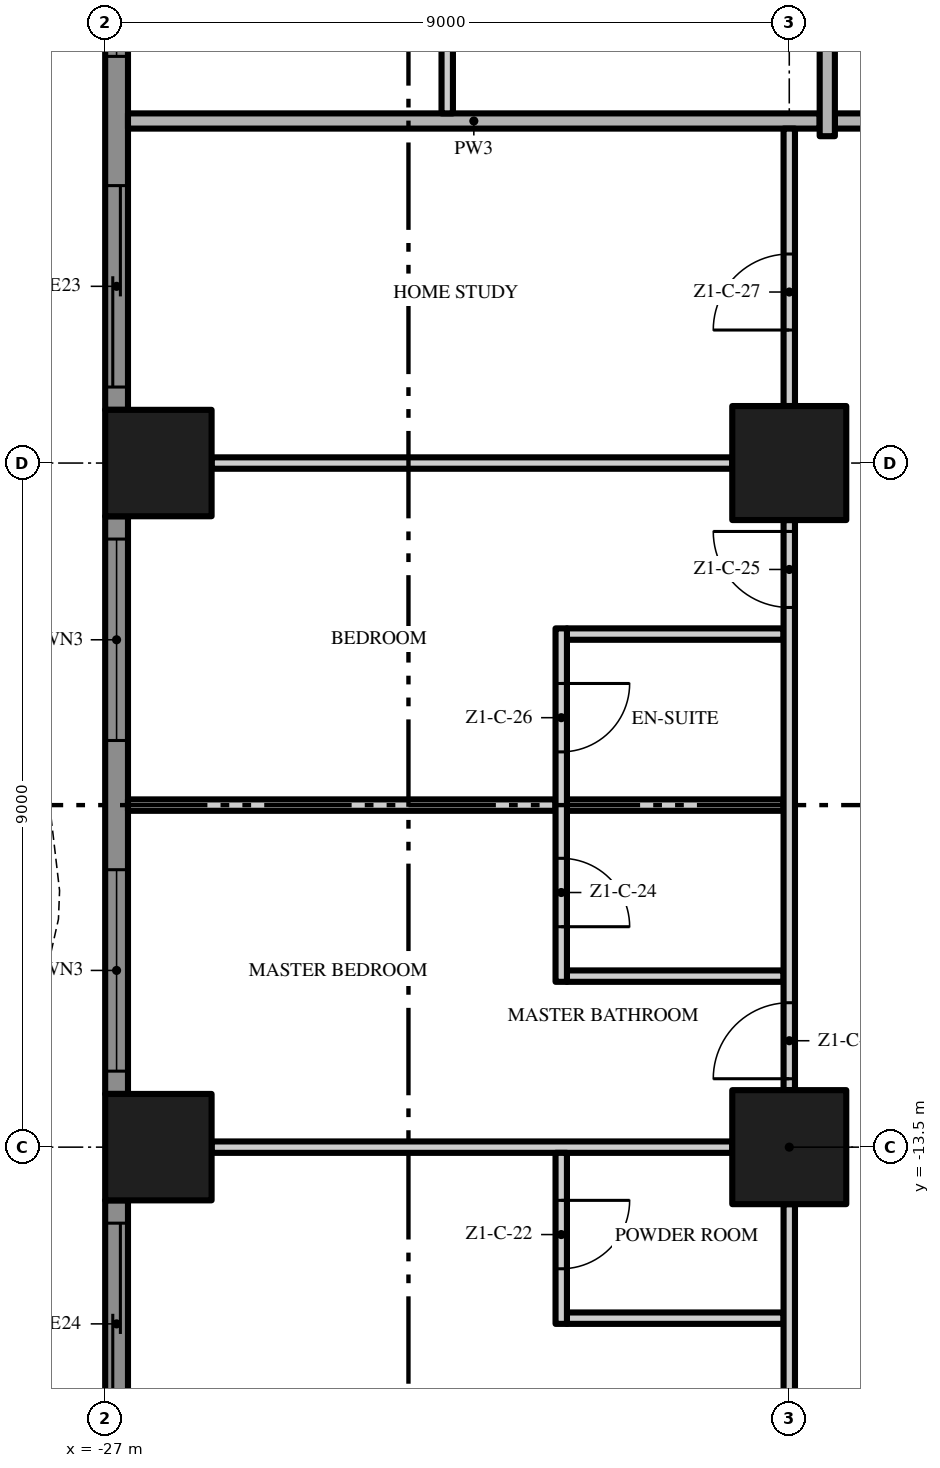
"""IFC4 building model, lengths in metres.
Left out: names, types, materials, properties, quantities, classifications, styles, units other than length and angle.
Written with IfcOpenShell. Run it as: python <this file> out.ifc"""

import sys

from ifc_helpers import new_model, si_unit, direction, frame, frame_2d, origin, origin_2d, place, context, subcontext, project, spatial, polyline, rectangle, outline, extrude, element, fill, save


model = new_model("IFC4")
c1 = context("Model", 3, precision=1e-05, world=origin(), true_north=direction((0.0, 1.0)))
c2 = subcontext(c1, "Body", "Model", "MODEL_VIEW")
j1 = project(units=[si_unit("LENGTHUNIT", "METRE"), si_unit("PLANEANGLEUNIT", "RADIAN")], contexts=[c1])
p1 = place(None, origin())
s1 = spatial("IfcSite", under=j1, at=p1, CompositionType="ELEMENT")
p2 = place(p1, origin())
s2 = spatial("IfcBuilding", under=s1, at=p2, CompositionType="ELEMENT")
p3 = place(p2, frame((0.0, 0.0, 41.6)))
s3 = spatial("IfcBuildingStorey", under=s2, at=p3, CompositionType="ELEMENT", Elevation=41.6)
for number, where, z_axis, x_axis in (
    (1, (-18.0, -13.5, 0.0), (0.0, 0.0, 1.0), (1.0, 0.0, 0.0)),
    (2, (-18.0, -4.5, 0.0), (0.0, 0.0, 1.0), (1.0, 0.0, 0.0)),
):
    element("IfcColumn", number, at=place(p3, frame(where, z_axis=z_axis, x_axis=x_axis)), inside=s3, PredefinedType="COLUMN", context=c2, shape_type="SweptSolid", body=[
        extrude(rectangle(XDim=1.5, YDim=1.5, at=origin_2d()), origin(), (0.0, 0.0, 1.0), 3.5),
    ])
for number, where, z_axis, x_axis in (
    (3, (-26.3, -13.5, 0.0), (0.0, 0.0, 1.0), (1.0, 0.0, 0.0)),
    (4, (-26.3, -4.5, 0.0), (0.0, 0.0, 1.0), (1.0, 0.0, 0.0)),
):
    element("IfcColumn", number, at=place(p3, frame(where, z_axis=z_axis, x_axis=x_axis)), inside=s3, PredefinedType="COLUMN", context=c2, shape_type="SweptSolid", body=[
        extrude(rectangle(XDim=1.4, YDim=1.4, at=origin_2d()), origin(), (0.0, 0.0, 1.0), 3.5),
    ])
p4 = place(p3, frame((-26.85, -3.8, 0.0), z_axis=(0.0, 0.0, 1.0), x_axis=(0.0, 1.0, 0.0)))
e5 = element("IfcWall", 5, at=p4, inside=s3, PredefinedType="SOLIDWALL", context=c2, shape_type="SweptSolid", body=[
    extrude(rectangle(XDim=7.6, YDim=0.3, at=frame_2d((3.8, 0.0))), origin(), (0.0, 0.0, 1.0), 3.5),
])
p5 = place(p4, frame((4.65, 0.0, 0.45)))
e6 = element("IfcOpeningElement", 6, at=p5, cuts=e5, PredefinedType="OPENING", context=c2, shape_type="SweptSolid", body=[
    extrude(rectangle(XDim=2.65, YDim=2.65, at=frame_2d((1.325, 1.325))), frame((0.0, 0.16, 0.0), z_axis=(0.0, -1.0, 0.0), x_axis=(1.0, 0.0, 0.0)), (0.0, 0.0, 1.0), 0.32),
])
p6 = place(p4, frame((0.3, 0.0, 0.0)))
e7 = element("IfcOpeningElement", 7, at=p6, cuts=e5, PredefinedType="OPENING", context=c2, shape_type="SweptSolid", body=[
    extrude(rectangle(XDim=2.65, YDim=2.4, at=frame_2d((1.325, 1.2))), frame((0.0, 0.16, 0.0), z_axis=(0.0, -1.0, 0.0), x_axis=(1.0, 0.0, 0.0)), (0.0, 0.0, 1.0), 0.32),
])
p7 = place(p3, frame((-26.85, -12.8, 0.0), z_axis=(0.0, 0.0, 1.0), x_axis=(0.0, 1.0, 0.0)))
e8 = element("IfcWall", 8, at=p7, inside=s3, PredefinedType="SOLIDWALL", context=c2, shape_type="SweptSolid", body=[
    extrude(rectangle(XDim=7.6, YDim=0.3, at=frame_2d((3.8, 0.0))), origin(), (0.0, 0.0, 1.0), 3.5),
])
p8 = place(p7, frame((4.65, 0.0, 0.45)))
e9 = element("IfcOpeningElement", 9, at=p8, cuts=e8, PredefinedType="OPENING", context=c2, shape_type="SweptSolid", body=[
    extrude(rectangle(XDim=2.65, YDim=2.65, at=frame_2d((1.325, 1.325))), frame((0.0, 0.16, 0.0), z_axis=(0.0, -1.0, 0.0), x_axis=(1.0, 0.0, 0.0)), (0.0, 0.0, 1.0), 0.32),
])
p9 = place(p7, frame((0.3, 0.0, 0.45)))
e10 = element("IfcOpeningElement", 10, at=p9, cuts=e8, PredefinedType="OPENING", context=c2, shape_type="SweptSolid", body=[
    extrude(rectangle(XDim=2.65, YDim=2.65, at=frame_2d((1.325, 1.325))), frame((0.0, 0.16, 0.0), z_axis=(0.0, -1.0, 0.0), x_axis=(1.0, 0.0, 0.0)), (0.0, 0.0, 1.0), 0.32),
])
p10 = place(p3, frame((-26.85, -18.0, 0.0), z_axis=(0.0, 0.0, 1.0), x_axis=(0.0, 1.0, 0.0)))
e11 = element("IfcWall", 11, at=p10, inside=s3, PredefinedType="SOLIDWALL", context=c2, shape_type="SweptSolid", body=[
    extrude(rectangle(XDim=3.8, YDim=0.3, at=frame_2d((1.9, 0.0))), origin(), (0.0, 0.0, 1.0), 3.5),
])
p11 = place(p10, frame((0.85, 0.0, 0.0)))
e12 = element("IfcOpeningElement", 12, at=p11, cuts=e11, PredefinedType="OPENING", context=c2, shape_type="SweptSolid", body=[
    extrude(rectangle(XDim=2.65, YDim=2.4, at=frame_2d((1.325, 1.2))), frame((0.0, 0.16, 0.0), z_axis=(0.0, -1.0, 0.0), x_axis=(1.0, 0.0, 0.0)), (0.0, 0.0, 1.0), 0.32),
])
p12 = place(p3, origin())
e13 = element("IfcWall", 13, at=p12, inside=s3, PredefinedType="USERDEFINED", context=c2, shape_type="SweptSolid", body=[
    extrude(outline(polyline([(-27.951, 18.0), (-28.612, 16.5), (-29.345, 15.0), (-29.869, 13.5), (-30.0, 12.375), (-29.985, 12.0), (-29.649, 10.5), (-28.988, 9.0), (-28.255, 7.5), (-27.731, 6.0), (-27.6, 4.875), (-27.615, 4.5), (-27.951, 3.0), (-28.612, 1.5), (-29.345, 0.0), (-29.869, -1.5), (-30.0, -2.625), (-29.985, -3.0), (-29.649, -4.5), (-28.988, -6.0), (-28.255, -7.5), (-27.731, -9.0), (-27.6, -10.125), (-27.615, -10.5), (-27.951, -12.0), (-28.612, -13.5), (-29.345, -15.0), (-29.869, -16.5), (-30.0, -17.625), (-29.985, -18.0), (-29.735, -17.99), (-29.749, -17.635), (-29.624, -16.556), (-29.114, -15.096), (-28.385, -13.605), (-27.713, -12.079), (-27.366, -10.533), (-27.349, -10.115), (-27.486, -8.944), (-28.024, -7.404), (-28.761, -5.895), (-29.41, -4.421), (-29.736, -2.967), (-29.749, -2.635), (-29.624, -1.556), (-29.114, -0.096), (-28.385, 1.395), (-27.713, 2.921), (-27.366, 4.467), (-27.349, 4.885), (-27.486, 6.056), (-28.024, 7.596), (-28.761, 9.105), (-29.41, 10.579), (-29.736, 12.033), (-29.749, 12.365), (-29.624, 13.444), (-29.114, 14.904), (-28.385, 16.395), (-27.723, 17.899), (-27.951, 18.0)])), origin(), (0.0, 0.0, 1.0), 0.9),
])
p13 = place(p3, frame((-20.925, -15.75, 0.0), z_axis=(0.0, 0.0, 1.0), x_axis=(1.0, 0.0, 0.0)))
e14 = element("IfcWall", 14, at=p13, inside=s3, PredefinedType="PARTITIONING", context=c2, shape_type="SweptSolid", body=[
    extrude(rectangle(XDim=2.85, YDim=0.15, at=frame_2d((1.425, 0.0))), origin(), (0.0, 0.0, 1.0), 3.5),
])
p14 = place(p3, frame((-25.6, -13.5, 0.0), z_axis=(0.0, 0.0, 1.0), x_axis=(1.0, 0.0, 0.0)))
e15 = element("IfcWall", 15, at=p14, inside=s3, PredefinedType="PARTITIONING", context=c2, shape_type="SweptSolid", body=[
    extrude(rectangle(XDim=6.85, YDim=0.15, at=frame_2d((3.425, 0.0))), origin(), (0.0, 0.0, 1.0), 3.5),
])
p15 = place(p3, frame((-20.925, -11.25, 0.0), z_axis=(0.0, 0.0, 1.0), x_axis=(1.0, 0.0, 0.0)))
e16 = element("IfcWall", 16, at=p15, inside=s3, PredefinedType="PARTITIONING", context=c2, shape_type="SweptSolid", body=[
    extrude(rectangle(XDim=2.85, YDim=0.15, at=frame_2d((1.425, 0.0))), origin(), (0.0, 0.0, 1.0), 3.5),
])
p16 = place(p3, frame((-26.7, -9.0, 0.0), z_axis=(0.0, 0.0, 1.0), x_axis=(1.0, 0.0, 0.0)))
e17 = element("IfcWall", 17, at=p16, inside=s3, PredefinedType="PARTITIONING", context=c2, shape_type="SweptSolid", body=[
    extrude(rectangle(XDim=5.625, YDim=0.15, at=frame_2d((2.812, 0.0))), origin(), (0.0, 0.0, 1.0), 3.5),
])
for number, where, z_axis, x_axis in (
    (18, (-20.925, -9.0, 0.0), (0.0, 0.0, 1.0), (1.0, 0.0, 0.0)),
    (19, (-20.925, -6.75, 0.0), (0.0, 0.0, 1.0), (1.0, 0.0, 0.0)),
):
    element("IfcWall", number, at=place(p3, frame(where, z_axis=z_axis, x_axis=x_axis)), inside=s3, PredefinedType="PARTITIONING", context=c2, shape_type="SweptSolid", body=[
        extrude(rectangle(XDim=2.85, YDim=0.15, at=frame_2d((1.425, 0.0))), origin(), (0.0, 0.0, 1.0), 3.5),
    ])
p17 = place(p3, frame((-25.6, -4.5, 0.0), z_axis=(0.0, 0.0, 1.0), x_axis=(1.0, 0.0, 0.0)))
e20 = element("IfcWall", 20, at=p17, inside=s3, PredefinedType="PARTITIONING", context=c2, shape_type="SweptSolid", body=[
    extrude(rectangle(XDim=6.85, YDim=0.15, at=frame_2d((3.425, 0.0))), origin(), (0.0, 0.0, 1.0), 3.5),
])
p18 = place(p3, frame((-17.4, 0.0, 0.0), z_axis=(0.0, 0.0, 1.0), x_axis=(1.0, 0.0, 0.0)))
e21 = element("IfcWall", 21, at=p18, inside=s3, PredefinedType="PARTITIONING", context=c2, shape_type="SweptSolid", body=[
    extrude(rectangle(XDim=12.8, YDim=0.2, at=frame_2d((6.4, 0.0))), origin(), (0.0, 0.0, 1.0), 3.5),
])
p19 = place(p3, frame((-26.7, 0.0, 0.0), z_axis=(0.0, 0.0, 1.0), x_axis=(1.0, 0.0, 0.0)))
e22 = element("IfcWall", 22, at=p19, inside=s3, PredefinedType="PARTITIONING", context=c2, shape_type="SweptSolid", body=[
    extrude(rectangle(XDim=9.1, YDim=0.2, at=frame_2d((4.55, 0.0))), origin(), (0.0, 0.0, 1.0), 3.5),
])
p20 = place(p3, frame((-22.5, 0.1, 0.0), z_axis=(0.0, 0.0, 1.0), x_axis=(0.0, 1.0, 0.0)))
e23 = element("IfcWall", 23, at=p20, inside=s3, PredefinedType="PARTITIONING", context=c2, shape_type="SweptSolid", body=[
    extrude(rectangle(XDim=17.2, YDim=0.15, at=frame_2d((8.6, 0.0))), origin(), (0.0, 0.0, 1.0), 3.5),
])
p21 = place(p20, frame((1.65, 0.0, 0.0)))
e24 = element("IfcOpeningElement", 24, at=p21, cuts=e23, PredefinedType="OPENING", context=c2, shape_type="SweptSolid", body=[
    extrude(rectangle(XDim=1.0, YDim=2.4, at=frame_2d((0.5, 1.2))), frame((0.0, 0.085, 0.0), z_axis=(0.0, -1.0, 0.0), x_axis=(1.0, 0.0, 0.0)), (0.0, 0.0, 1.0), 0.17),
])
p22 = place(p20, frame((8.0, 0.0, 0.0)))
e25 = element("IfcOpeningElement", 25, at=p22, cuts=e23, PredefinedType="OPENING", context=c2, shape_type="SweptSolid", body=[
    extrude(rectangle(XDim=1.8, YDim=2.4, at=frame_2d((0.9, 1.2))), frame((0.0, 0.085, 0.0), z_axis=(0.0, -1.0, 0.0), x_axis=(1.0, 0.0, 0.0)), (0.0, 0.0, 1.0), 0.17),
])
p23 = place(p20, frame((16.05, 0.0, 0.0)))
e26 = element("IfcOpeningElement", 26, at=p23, cuts=e23, PredefinedType="OPENING", context=c2, shape_type="SweptSolid", body=[
    extrude(rectangle(XDim=1.0, YDim=2.4, at=frame_2d((0.5, 1.2))), frame((0.0, 0.085, 0.0), z_axis=(0.0, -1.0, 0.0), x_axis=(1.0, 0.0, 0.0)), (0.0, 0.0, 1.0), 0.17),
])
p24 = place(p3, frame((-21.0, -13.575, 0.0), z_axis=(0.0, 0.0, 1.0), x_axis=(0.0, -1.0, 0.0)))
e27 = element("IfcWall", 27, at=p24, inside=s3, PredefinedType="PARTITIONING", context=c2, shape_type="SweptSolid", body=[
    extrude(rectangle(XDim=2.25, YDim=0.15, at=frame_2d((1.125, 0.0))), origin(), (0.0, 0.0, 1.0), 3.5),
])
p25 = place(p24, frame((0.625, 0.0, 0.0)))
e28 = element("IfcOpeningElement", 28, at=p25, cuts=e27, PredefinedType="OPENING", context=c2, shape_type="SweptSolid", body=[
    extrude(rectangle(XDim=0.9, YDim=2.1, at=frame_2d((0.45, 1.05))), frame((0.0, 0.085, 0.0), z_axis=(0.0, -1.0, 0.0), x_axis=(1.0, 0.0, 0.0)), (0.0, 0.0, 1.0), 0.17),
])
p26 = place(p3, frame((-21.0, -6.675, 0.0), z_axis=(0.0, 0.0, 1.0), x_axis=(0.0, -1.0, 0.0)))
e29 = element("IfcWall", 29, at=p26, inside=s3, PredefinedType="PARTITIONING", context=c2, shape_type="SweptSolid", body=[
    extrude(rectangle(XDim=4.65, YDim=0.15, at=frame_2d((2.325, 0.0))), origin(), (0.0, 0.0, 1.0), 3.5),
])
p27 = place(p26, frame((3.025, 0.0, 0.0)))
e30 = element("IfcOpeningElement", 30, at=p27, cuts=e29, PredefinedType="OPENING", context=c2, shape_type="SweptSolid", body=[
    extrude(rectangle(XDim=0.9, YDim=2.1, at=frame_2d((0.45, 1.05))), frame((0.0, 0.085, 0.0), z_axis=(0.0, -1.0, 0.0), x_axis=(1.0, 0.0, 0.0)), (0.0, 0.0, 1.0), 0.17),
])
p28 = place(p26, frame((0.725, 0.0, 0.0)))
e31 = element("IfcOpeningElement", 31, at=p28, cuts=e29, PredefinedType="OPENING", context=c2, shape_type="SweptSolid", body=[
    extrude(rectangle(XDim=0.9, YDim=2.1, at=frame_2d((0.45, 1.05))), frame((0.0, 0.085, 0.0), z_axis=(0.0, -1.0, 0.0), x_axis=(1.0, 0.0, 0.0)), (0.0, 0.0, 1.0), 0.17),
])
p29 = place(p3, frame((-18.0, -21.1, 0.0), z_axis=(0.0, 0.0, 1.0), x_axis=(0.0, 1.0, 0.0)))
e32 = element("IfcWall", 32, at=p29, inside=s3, PredefinedType="PARTITIONING", context=c2, shape_type="SweptSolid", body=[
    extrude(rectangle(XDim=6.85, YDim=0.15, at=frame_2d((3.425, 0.0))), origin(), (0.0, 0.0, 1.0), 3.5),
])
p30 = place(p29, frame((1.1, 0.0, 0.0)))
e33 = element("IfcOpeningElement", 33, at=p30, cuts=e32, PredefinedType="OPENING", context=c2, shape_type="SweptSolid", body=[
    extrude(rectangle(XDim=1.8, YDim=2.4, at=frame_2d((0.9, 1.2))), frame((0.0, 0.085, 0.0), z_axis=(0.0, -1.0, 0.0), x_axis=(1.0, 0.0, 0.0)), (0.0, 0.0, 1.0), 0.17),
])
p31 = place(p3, frame((-18.0, -12.75, 0.0), z_axis=(0.0, 0.0, 1.0), x_axis=(0.0, 1.0, 0.0)))
e34 = element("IfcWall", 34, at=p31, inside=s3, PredefinedType="PARTITIONING", context=c2, shape_type="SweptSolid", body=[
    extrude(rectangle(XDim=7.5, YDim=0.15, at=frame_2d((3.75, 0.0))), origin(), (0.0, 0.0, 1.0), 3.5),
])
p32 = place(p31, frame((0.15, 0.0, 0.0)))
e35 = element("IfcOpeningElement", 35, at=p32, cuts=e34, PredefinedType="OPENING", context=c2, shape_type="SweptSolid", body=[
    extrude(rectangle(XDim=1.0, YDim=2.4, at=frame_2d((0.5, 1.2))), frame((0.0, 0.085, 0.0), z_axis=(0.0, -1.0, 0.0), x_axis=(1.0, 0.0, 0.0)), (0.0, 0.0, 1.0), 0.17),
])
p33 = place(p31, frame((6.35, 0.0, 0.0)))
e36 = element("IfcOpeningElement", 36, at=p33, cuts=e34, PredefinedType="OPENING", context=c2, shape_type="SweptSolid", body=[
    extrude(rectangle(XDim=1.0, YDim=2.4, at=frame_2d((0.5, 1.2))), frame((0.0, 0.085, 0.0), z_axis=(0.0, -1.0, 0.0), x_axis=(1.0, 0.0, 0.0)), (0.0, 0.0, 1.0), 0.17),
])
p34 = place(p3, frame((-18.0, -3.75, 0.0), z_axis=(0.0, 0.0, 1.0), x_axis=(0.0, 1.0, 0.0)))
e37 = element("IfcWall", 37, at=p34, inside=s3, PredefinedType="PARTITIONING", context=c2, shape_type="SweptSolid", body=[
    extrude(rectangle(XDim=3.65, YDim=0.15, at=frame_2d((1.825, 0.0))), origin(), (0.0, 0.0, 1.0), 3.5),
])
p35 = place(p34, frame((1.0, 0.0, 0.0)))
e38 = element("IfcOpeningElement", 38, at=p35, cuts=e37, PredefinedType="OPENING", context=c2, shape_type="SweptSolid", body=[
    extrude(rectangle(XDim=1.0, YDim=2.4, at=frame_2d((0.5, 1.2))), frame((0.0, 0.085, 0.0), z_axis=(0.0, -1.0, 0.0), x_axis=(1.0, 0.0, 0.0)), (0.0, 0.0, 1.0), 0.17),
])
p36 = place(p3, frame((-17.5, -0.2, 0.0), z_axis=(0.0, 0.0, 1.0), x_axis=(0.0, 1.0, 0.0)))
e39 = element("IfcWall", 39, at=p36, inside=s3, PredefinedType="PARTITIONING", context=c2, shape_type="SweptSolid", body=[
    extrude(rectangle(XDim=3.95, YDim=0.2, at=frame_2d((1.975, 0.0))), origin(), (0.0, 0.0, 1.0), 3.5),
])
p37 = place(p5, origin())
e40 = element("IfcWindow", 40, at=p37, inside=s3, PartitioningType="SINGLE_PANEL", PredefinedType="WINDOW", context=c2, shape_type="SweptSolid", body=[
    extrude(rectangle(XDim=2.65, YDim=2.65, at=frame_2d((1.325, 1.325))), frame((0.0, 0.03, 0.0), z_axis=(0.0, -1.0, 0.0), x_axis=(1.0, 0.0, 0.0)), (0.0, 0.0, 1.0), 0.06),
])
fill(e6, e40)
p38 = place(p6, origin())
e41 = element("IfcDoor", 41, at=p38, inside=s3, OperationType="SINGLE_SWING_LEFT", PredefinedType="DOOR", context=c2, shape_type="SweptSolid", body=[
    extrude(rectangle(XDim=2.65, YDim=2.4, at=frame_2d((1.325, 1.2))), frame((0.0, 0.025, 0.0), z_axis=(0.0, -1.0, 0.0), x_axis=(1.0, 0.0, 0.0)), (0.0, 0.0, 1.0), 0.05),
])
fill(e7, e41)
p39 = place(p8, origin())
e42 = element("IfcWindow", 42, at=p39, inside=s3, PartitioningType="SINGLE_PANEL", PredefinedType="WINDOW", context=c2, shape_type="SweptSolid", body=[
    extrude(rectangle(XDim=2.65, YDim=2.65, at=frame_2d((1.325, 1.325))), frame((0.0, 0.03, 0.0), z_axis=(0.0, -1.0, 0.0), x_axis=(1.0, 0.0, 0.0)), (0.0, 0.0, 1.0), 0.06),
])
fill(e9, e42)
p40 = place(p9, origin())
e43 = element("IfcWindow", 43, at=p40, inside=s3, PartitioningType="SINGLE_PANEL", PredefinedType="WINDOW", context=c2, shape_type="SweptSolid", body=[
    extrude(rectangle(XDim=2.65, YDim=2.65, at=frame_2d((1.325, 1.325))), frame((0.0, 0.03, 0.0), z_axis=(0.0, -1.0, 0.0), x_axis=(1.0, 0.0, 0.0)), (0.0, 0.0, 1.0), 0.06),
])
fill(e10, e43)
p41 = place(p11, origin())
e44 = element("IfcDoor", 44, at=p41, inside=s3, OperationType="SINGLE_SWING_LEFT", PredefinedType="DOOR", context=c2, shape_type="SweptSolid", body=[
    extrude(rectangle(XDim=2.65, YDim=2.4, at=frame_2d((1.325, 1.2))), frame((0.0, 0.025, 0.0), z_axis=(0.0, -1.0, 0.0), x_axis=(1.0, 0.0, 0.0)), (0.0, 0.0, 1.0), 0.05),
])
fill(e12, e44)
p42 = place(p25, origin())
e45 = element("IfcDoor", 45, at=p42, inside=s3, OperationType="SINGLE_SWING_LEFT", PredefinedType="DOOR", context=c2, shape_type="SweptSolid", body=[
    extrude(rectangle(XDim=0.9, YDim=2.1, at=frame_2d((0.45, 1.05))), frame((0.0, 0.025, 0.0), z_axis=(0.0, -1.0, 0.0), x_axis=(1.0, 0.0, 0.0)), (0.0, 0.0, 1.0), 0.05),
])
fill(e28, e45)
p43 = place(p32, origin())
e46 = element("IfcDoor", 46, at=p43, inside=s3, OperationType="SINGLE_SWING_LEFT", PredefinedType="DOOR", context=c2, shape_type="SweptSolid", body=[
    extrude(rectangle(XDim=1.0, YDim=2.4, at=frame_2d((0.5, 1.2))), frame((0.0, 0.025, 0.0), z_axis=(0.0, -1.0, 0.0), x_axis=(1.0, 0.0, 0.0)), (0.0, 0.0, 1.0), 0.05),
])
fill(e35, e46)
p44 = place(p27, origin())
e47 = element("IfcDoor", 47, at=p44, inside=s3, OperationType="SINGLE_SWING_RIGHT", PredefinedType="DOOR", context=c2, shape_type="SweptSolid", body=[
    extrude(rectangle(XDim=0.9, YDim=2.1, at=frame_2d((0.45, 1.05))), frame((0.0, 0.025, 0.0), z_axis=(0.0, -1.0, 0.0), x_axis=(1.0, 0.0, 0.0)), (0.0, 0.0, 1.0), 0.05),
])
fill(e30, e47)
p45 = place(p33, origin())
e48 = element("IfcDoor", 48, at=p45, inside=s3, OperationType="SINGLE_SWING_RIGHT", PredefinedType="DOOR", context=c2, shape_type="SweptSolid", body=[
    extrude(rectangle(XDim=1.0, YDim=2.4, at=frame_2d((0.5, 1.2))), frame((0.0, 0.025, 0.0), z_axis=(0.0, -1.0, 0.0), x_axis=(1.0, 0.0, 0.0)), (0.0, 0.0, 1.0), 0.05),
])
fill(e36, e48)
p46 = place(p28, origin())
e49 = element("IfcDoor", 49, at=p46, inside=s3, OperationType="SINGLE_SWING_LEFT", PredefinedType="DOOR", context=c2, shape_type="SweptSolid", body=[
    extrude(rectangle(XDim=0.9, YDim=2.1, at=frame_2d((0.45, 1.05))), frame((0.0, 0.025, 0.0), z_axis=(0.0, -1.0, 0.0), x_axis=(1.0, 0.0, 0.0)), (0.0, 0.0, 1.0), 0.05),
])
fill(e31, e49)
p47 = place(p35, origin())
e50 = element("IfcDoor", 50, at=p47, inside=s3, OperationType="SINGLE_SWING_LEFT", PredefinedType="DOOR", context=c2, shape_type="SweptSolid", body=[
    extrude(rectangle(XDim=1.0, YDim=2.4, at=frame_2d((0.5, 1.2))), frame((0.0, 0.025, 0.0), z_axis=(0.0, -1.0, 0.0), x_axis=(1.0, 0.0, 0.0)), (0.0, 0.0, 1.0), 0.05),
])
fill(e38, e50)
save(model, sys.argv[1])
